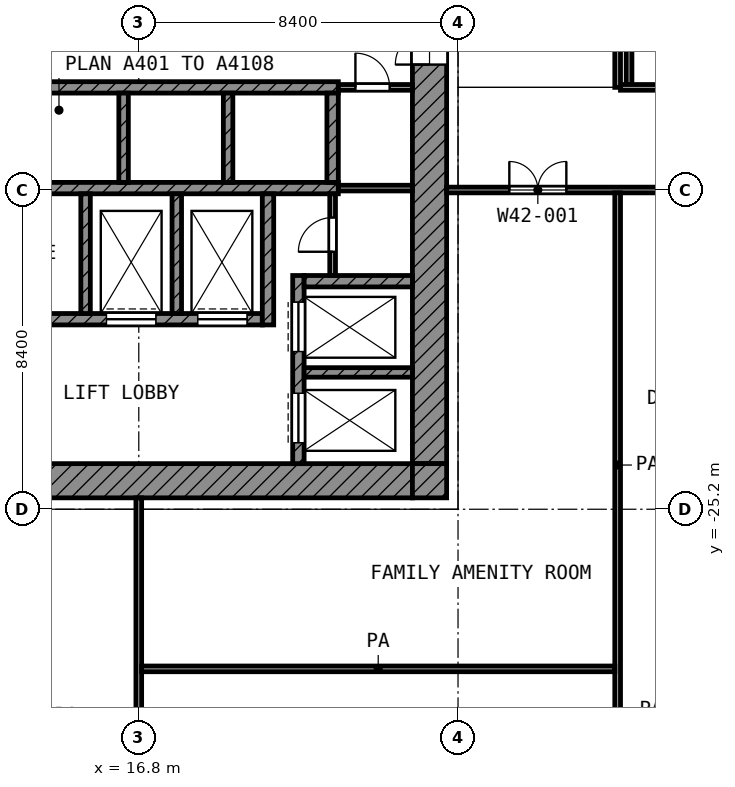
"""IFC4 building model, lengths in metres.
Left out: names, types, materials, properties, quantities, classifications, styles, units other than length and angle.
Written with IfcOpenShell. Run it as: python <this file> out.ifc"""

import sys

from ifc_helpers import new_model, si_unit, direction, frame, frame_2d, origin, place, context, subcontext, project, spatial, rectangle, extrude, element, fill, save


model = new_model("IFC4")
c1 = context("Model", 3, precision=1e-05, world=origin(), true_north=direction((0.0, 1.0)))
c2 = subcontext(c1, "Body", "Model", "MODEL_VIEW")
j1 = project(units=[si_unit("LENGTHUNIT", "METRE"), si_unit("PLANEANGLEUNIT", "RADIAN")], contexts=[c1])
p1 = place(None, origin())
s1 = spatial("IfcSite", under=j1, at=p1, CompositionType="ELEMENT")
p2 = place(p1, origin())
s2 = spatial("IfcBuilding", under=s1, at=p2, CompositionType="ELEMENT")
p3 = place(p2, frame((0.0, 0.0, 204.6)))
s3 = spatial("IfcBuildingStorey", under=s2, at=p3, CompositionType="ELEMENT", Elevation=204.6)
p4 = place(p3, frame((24.45, -24.0, 0.0), z_axis=(0.0, 0.0, 1.0), x_axis=(0.0, 1.0, 0.0)))
e1 = element("IfcWall", 1, at=p4, inside=s3, PredefinedType="SHEAR", context=c2, shape_type="SweptSolid", body=[
    extrude(rectangle(XDim=18.6, YDim=0.9, at=frame_2d((9.3, 0.0))), origin(), (0.0, 0.0, 1.0), 3.6),
])
p5 = place(p4, frame((10.5, 0.0, 0.0)))
e2 = element("IfcOpeningElement", 2, at=p5, cuts=e1, PredefinedType="OPENING", context=c2, shape_type="SweptSolid", body=[
    extrude(rectangle(XDim=1.8, YDim=2.1, at=frame_2d((0.9, 1.05))), frame((0.0, 0.46, 0.0), z_axis=(0.0, -1.0, 0.0), x_axis=(1.0, 0.0, 0.0)), (0.0, 0.0, 1.0), 0.92),
])
p6 = place(p3, frame((5.4, -24.45, 0.0), z_axis=(0.0, 0.0, 1.0), x_axis=(1.0, 0.0, 0.0)))
e3 = element("IfcWall", 3, at=p6, inside=s3, PredefinedType="SHEAR", context=c2, shape_type="SweptSolid", body=[
    extrude(rectangle(XDim=18.6, YDim=0.9, at=frame_2d((9.3, 0.0))), origin(), (0.0, 0.0, 1.0), 3.6),
])
p7 = place(p6, frame((6.3, 0.0, 0.0)))
e4 = element("IfcOpeningElement", 4, at=p7, cuts=e3, PredefinedType="OPENING", context=c2, shape_type="SweptSolid", body=[
    extrude(rectangle(XDim=1.8, YDim=2.1, at=frame_2d((0.9, 1.05))), frame((0.0, 0.46, 0.0), z_axis=(0.0, -1.0, 0.0), x_axis=(1.0, 0.0, 0.0)), (0.0, 0.0, 1.0), 0.92),
])
p8 = place(p3, frame((24.45, -24.9, 0.0), z_axis=(0.0, 0.0, 1.0), x_axis=(0.0, 1.0, 0.0)))
e5 = element("IfcWall", 5, at=p8, inside=s3, PredefinedType="SHEAR", context=c2, shape_type="SweptSolid", body=[
    extrude(rectangle(XDim=0.9, YDim=0.9, at=frame_2d((0.45, 0.0))), origin(), (0.0, 0.0, 1.0), 3.6),
])
p9 = place(p3, frame((5.4, -14.1, 0.0), z_axis=(0.0, 0.0, 1.0), x_axis=(1.0, 0.0, 0.0)))
e6 = element("IfcWall", 6, at=p9, inside=s3, PredefinedType="SHEAR", context=c2, shape_type="SweptSolid", body=[
    extrude(rectangle(XDim=16.65, YDim=0.3, at=frame_2d((8.325, 0.0))), origin(), (0.0, 0.0, 1.0), 3.6),
])
p10 = place(p9, frame((0.825, 0.0, 0.0)))
e7 = element("IfcOpeningElement", 7, at=p10, cuts=e6, PredefinedType="OPENING", context=c2, shape_type="SweptSolid", body=[
    extrude(rectangle(XDim=1.1, YDim=2.1, at=frame_2d((0.55, 1.05))), frame((0.0, 0.16, 0.0), z_axis=(0.0, -1.0, 0.0), x_axis=(1.0, 0.0, 0.0)), (0.0, 0.0, 1.0), 0.32),
])
p11 = place(p9, frame((3.575, 0.0, 0.0)))
e8 = element("IfcOpeningElement", 8, at=p11, cuts=e6, PredefinedType="OPENING", context=c2, shape_type="SweptSolid", body=[
    extrude(rectangle(XDim=1.1, YDim=2.1, at=frame_2d((0.55, 1.05))), frame((0.0, 0.16, 0.0), z_axis=(0.0, -1.0, 0.0), x_axis=(1.0, 0.0, 0.0)), (0.0, 0.0, 1.0), 0.32),
])
p12 = place(p3, frame((5.4, -16.75, 0.0), z_axis=(0.0, 0.0, 1.0), x_axis=(1.0, 0.0, 0.0)))
e9 = element("IfcWall", 9, at=p12, inside=s3, PredefinedType="SHEAR", context=c2, shape_type="SweptSolid", body=[
    extrude(rectangle(XDim=16.65, YDim=0.3, at=frame_2d((8.325, 0.0))), origin(), (0.0, 0.0, 1.0), 3.6),
])
p13 = place(p3, frame((5.4, -20.2, 0.0), z_axis=(0.0, 0.0, 1.0), x_axis=(1.0, 0.0, 0.0)))
e10 = element("IfcWall", 10, at=p13, inside=s3, PredefinedType="SHEAR", context=c2, shape_type="SweptSolid", body=[
    extrude(rectangle(XDim=14.65, YDim=0.3, at=frame_2d((7.325, 0.0))), origin(), (0.0, 0.0, 1.0), 3.6),
])
p14 = place(p13, frame((10.55, 0.0, 0.0)))
e11 = element("IfcOpeningElement", 11, at=p14, cuts=e10, PredefinedType="OPENING", context=c2, shape_type="SweptSolid", body=[
    extrude(rectangle(XDim=1.3, YDim=2.1, at=frame_2d((0.65, 1.05))), frame((0.0, 0.16, 0.0), z_axis=(0.0, -1.0, 0.0), x_axis=(1.0, 0.0, 0.0)), (0.0, 0.0, 1.0), 0.32),
])
p15 = place(p13, frame((12.95, 0.0, 0.0)))
e12 = element("IfcOpeningElement", 12, at=p15, cuts=e10, PredefinedType="OPENING", context=c2, shape_type="SweptSolid", body=[
    extrude(rectangle(XDim=1.3, YDim=2.1, at=frame_2d((0.65, 1.05))), frame((0.0, 0.16, 0.0), z_axis=(0.0, -1.0, 0.0), x_axis=(1.0, 0.0, 0.0)), (0.0, 0.0, 1.0), 0.32),
])
p16 = place(p13, frame((0.55, 0.0, 0.0)))
e13 = element("IfcOpeningElement", 13, at=p16, cuts=e10, PredefinedType="OPENING", context=c2, shape_type="SweptSolid", body=[
    extrude(rectangle(XDim=1.3, YDim=2.1, at=frame_2d((0.65, 1.05))), frame((0.0, 0.16, 0.0), z_axis=(0.0, -1.0, 0.0), x_axis=(1.0, 0.0, 0.0)), (0.0, 0.0, 1.0), 0.32),
])
p17 = place(p13, frame((2.95, 0.0, 0.0)))
e14 = element("IfcOpeningElement", 14, at=p17, cuts=e10, PredefinedType="OPENING", context=c2, shape_type="SweptSolid", body=[
    extrude(rectangle(XDim=1.3, YDim=2.1, at=frame_2d((0.65, 1.05))), frame((0.0, 0.16, 0.0), z_axis=(0.0, -1.0, 0.0), x_axis=(1.0, 0.0, 0.0)), (0.0, 0.0, 1.0), 0.32),
])
p18 = place(p13, frame((7.15, 0.0, 0.0)))
e15 = element("IfcOpeningElement", 15, at=p18, cuts=e10, PredefinedType="OPENING", context=c2, shape_type="SweptSolid", body=[
    extrude(rectangle(XDim=0.9, YDim=2.1, at=frame_2d((0.45, 1.05))), frame((0.0, 0.16, 0.0), z_axis=(0.0, -1.0, 0.0), x_axis=(1.0, 0.0, 0.0)), (0.0, 0.0, 1.0), 0.32),
])
p19 = place(p3, frame((20.2, -20.35, 0.0), z_axis=(0.0, 0.0, 1.0), x_axis=(0.0, 1.0, 0.0)))
e16 = element("IfcWall", 16, at=p19, inside=s3, PredefinedType="SHEAR", context=c2, shape_type="SweptSolid", body=[
    extrude(rectangle(XDim=3.45, YDim=0.3, at=frame_2d((1.725, 0.0))), origin(), (0.0, 0.0, 1.0), 3.6),
])
p20 = place(p3, frame((21.9, -16.6, 0.0), z_axis=(0.0, 0.0, 1.0), x_axis=(0.0, 1.0, 0.0)))
e17 = element("IfcWall", 17, at=p20, inside=s3, PredefinedType="SHEAR", context=c2, shape_type="SweptSolid", body=[
    extrude(rectangle(XDim=2.35, YDim=0.3, at=frame_2d((1.175, 0.0))), origin(), (0.0, 0.0, 1.0), 3.6),
])
p21 = place(p3, frame((21.15, -19.2, 0.0), z_axis=(0.0, 0.0, 1.0), x_axis=(1.0, 0.0, 0.0)))
e18 = element("IfcWall", 18, at=p21, inside=s3, PredefinedType="SHEAR", context=c2, shape_type="SweptSolid", body=[
    extrude(rectangle(XDim=2.85, YDim=0.3, at=frame_2d((1.425, 0.0))), origin(), (0.0, 0.0, 1.0), 3.6),
])
p22 = place(p3, frame((21.0, -24.0, 0.0), z_axis=(0.0, 0.0, 1.0), x_axis=(0.0, 1.0, 0.0)))
e19 = element("IfcWall", 19, at=p22, inside=s3, PredefinedType="SHEAR", context=c2, shape_type="SweptSolid", body=[
    extrude(rectangle(XDim=4.95, YDim=0.3, at=frame_2d((2.475, 0.0))), origin(), (0.0, 0.0, 1.0), 3.6),
])
p23 = place(p22, frame((2.95, 0.0, 0.0)))
e20 = element("IfcOpeningElement", 20, at=p23, cuts=e19, PredefinedType="OPENING", context=c2, shape_type="SweptSolid", body=[
    extrude(rectangle(XDim=1.3, YDim=2.1, at=frame_2d((0.65, 1.05))), frame((0.0, 0.16, 0.0), z_axis=(0.0, -1.0, 0.0), x_axis=(1.0, 0.0, 0.0)), (0.0, 0.0, 1.0), 0.32),
])
p24 = place(p22, frame((0.55, 0.0, 0.0)))
e21 = element("IfcOpeningElement", 21, at=p24, cuts=e19, PredefinedType="OPENING", context=c2, shape_type="SweptSolid", body=[
    extrude(rectangle(XDim=1.3, YDim=2.1, at=frame_2d((0.65, 1.05))), frame((0.0, 0.16, 0.0), z_axis=(0.0, -1.0, 0.0), x_axis=(1.0, 0.0, 0.0)), (0.0, 0.0, 1.0), 0.32),
])
p25 = place(p3, frame((21.15, -21.6, 0.0), z_axis=(0.0, 0.0, 1.0), x_axis=(1.0, 0.0, 0.0)))
e22 = element("IfcWall", 22, at=p25, inside=s3, PredefinedType="SHEAR", context=c2, shape_type="SweptSolid", body=[
    extrude(rectangle(XDim=2.85, YDim=0.25, at=frame_2d((1.425, 0.0))), origin(), (0.0, 0.0, 1.0), 3.6),
])
for number, where, z_axis, x_axis in (
    (23, (15.4, -20.05, 0.0), (0.0, 0.0, 1.0), (0.0, 1.0, 0.0)),
    (24, (17.8, -20.05, 0.0), (0.0, 0.0, 1.0), (0.0, 1.0, 0.0)),
):
    element("IfcWall", number, at=place(p3, frame(where, z_axis=z_axis, x_axis=x_axis)), inside=s3, PredefinedType="SHEAR", context=c2, shape_type="SweptSolid", body=[
        extrude(rectangle(XDim=3.15, YDim=0.25, at=frame_2d((1.575, 0.0))), origin(), (0.0, 0.0, 1.0), 3.6),
    ])
for number, where, z_axis, x_axis in (
    (25, (16.4, -16.6, 0.0), (0.0, 0.0, 1.0), (0.0, 1.0, 0.0)),
    (26, (19.15, -16.6, 0.0), (0.0, 0.0, 1.0), (0.0, 1.0, 0.0)),
):
    element("IfcWall", number, at=place(p3, frame(where, z_axis=z_axis, x_axis=x_axis)), inside=s3, PredefinedType="SHEAR", context=c2, shape_type="SweptSolid", body=[
        extrude(rectangle(XDim=2.35, YDim=0.25, at=frame_2d((1.175, 0.0))), origin(), (0.0, 0.0, 1.0), 3.6),
    ])
p26 = place(p3, frame((21.9, -19.05, 0.0), z_axis=(0.0, 0.0, 1.0), x_axis=(0.0, 1.0, 0.0)))
e27 = element("IfcWall", 27, at=p26, inside=s3, PredefinedType="PARTITIONING", context=c2, shape_type="SweptSolid", body=[
    extrude(rectangle(XDim=2.15, YDim=0.15, at=frame_2d((1.075, 0.0))), origin(), (0.0, 0.0, 1.0), 3.6),
])
p27 = place(p26, frame((0.625, 0.0, 0.0)))
e28 = element("IfcOpeningElement", 28, at=p27, cuts=e27, PredefinedType="OPENING", context=c2, shape_type="SweptSolid", body=[
    extrude(rectangle(XDim=0.9, YDim=2.1, at=frame_2d((0.45, 1.05))), frame((0.0, 0.085, 0.0), z_axis=(0.0, -1.0, 0.0), x_axis=(1.0, 0.0, 0.0)), (0.0, 0.0, 1.0), 0.17),
])
p28 = place(p3, frame((22.05, -16.75, 0.0), z_axis=(0.0, 0.0, 1.0), x_axis=(1.0, 0.0, 0.0)))
e29 = element("IfcWall", 29, at=p28, inside=s3, PredefinedType="PARTITIONING", context=c2, shape_type="SweptSolid", body=[
    extrude(rectangle(XDim=1.95, YDim=0.15, at=frame_2d((0.975, 0.0))), origin(), (0.0, 0.0, 1.0), 3.6),
])
p29 = place(p3, frame((22.05, -14.1, 0.0), z_axis=(0.0, 0.0, 1.0), x_axis=(1.0, 0.0, 0.0)))
e30 = element("IfcWall", 30, at=p29, inside=s3, PredefinedType="PARTITIONING", context=c2, shape_type="SweptSolid", body=[
    extrude(rectangle(XDim=1.95, YDim=0.15, at=frame_2d((0.975, 0.0))), origin(), (0.0, 0.0, 1.0), 3.6),
])
p30 = place(p29, frame((0.45, 0.0, 0.0)))
e31 = element("IfcOpeningElement", 31, at=p30, cuts=e30, PredefinedType="OPENING", context=c2, shape_type="SweptSolid", body=[
    extrude(rectangle(XDim=0.9, YDim=2.1, at=frame_2d((0.45, 1.05))), frame((0.0, 0.085, 0.0), z_axis=(0.0, -1.0, 0.0), x_axis=(1.0, 0.0, 0.0)), (0.0, 0.0, 1.0), 0.17),
])
p31 = place(p3, frame((16.875, -29.4, 0.0), z_axis=(0.0, 0.0, 1.0), x_axis=(1.0, 0.0, 0.0)))
e32 = element("IfcWall", 32, at=p31, inside=s3, PredefinedType="PARTITIONING", context=c2, shape_type="SweptSolid", body=[
    extrude(rectangle(XDim=12.45, YDim=0.15, at=frame_2d((6.225, 0.0))), origin(), (0.0, 0.0, 1.0), 3.6),
])
p32 = place(p3, frame((24.9, -16.8, 0.0), z_axis=(0.0, 0.0, 1.0), x_axis=(1.0, 0.0, 0.0)))
e33 = element("IfcWall", 33, at=p32, inside=s3, PredefinedType="PARTITIONING", context=c2, shape_type="SweptSolid", body=[
    extrude(rectangle(XDim=42.22, YDim=0.15, at=frame_2d((21.11, 0.0))), origin(), (0.0, 0.0, 1.0), 3.6),
])
p33 = place(p32, frame((1.65, 0.0, 0.0)))
e34 = element("IfcOpeningElement", 34, at=p33, cuts=e33, PredefinedType="OPENING", context=c2, shape_type="SweptSolid", body=[
    extrude(rectangle(XDim=1.5, YDim=2.1, at=frame_2d((0.75, 1.05))), frame((0.0, 0.085, 0.0), z_axis=(0.0, -1.0, 0.0), x_axis=(1.0, 0.0, 0.0)), (0.0, 0.0, 1.0), 0.17),
])
p34 = place(p32, frame((6.1, 0.0, 0.0)))
e35 = element("IfcOpeningElement", 35, at=p34, cuts=e33, PredefinedType="OPENING", context=c2, shape_type="SweptSolid", body=[
    extrude(rectangle(XDim=1.0, YDim=2.1, at=frame_2d((0.5, 1.05))), frame((0.0, 0.085, 0.0), z_axis=(0.0, -1.0, 0.0), x_axis=(1.0, 0.0, 0.0)), (0.0, 0.0, 1.0), 0.17),
])
p35 = place(p32, frame((10.2, 0.0, 0.0)))
e36 = element("IfcOpeningElement", 36, at=p35, cuts=e33, PredefinedType="OPENING", context=c2, shape_type="SweptSolid", body=[
    extrude(rectangle(XDim=1.2, YDim=2.1, at=frame_2d((0.6, 1.05))), frame((0.0, 0.085, 0.0), z_axis=(0.0, -1.0, 0.0), x_axis=(1.0, 0.0, 0.0)), (0.0, 0.0, 1.0), 0.17),
])
p36 = place(p32, frame((20.34, 0.0, 0.0)))
e37 = element("IfcOpeningElement", 37, at=p36, cuts=e33, PredefinedType="OPENING", context=c2, shape_type="SweptSolid", body=[
    extrude(rectangle(XDim=1.2, YDim=2.1, at=frame_2d((0.6, 1.05))), frame((0.0, 0.085, 0.0), z_axis=(0.0, -1.0, 0.0), x_axis=(1.0, 0.0, 0.0)), (0.0, 0.0, 1.0), 0.17),
])
p37 = place(p32, frame((18.78, 0.0, 0.0)))
e38 = element("IfcOpeningElement", 38, at=p37, cuts=e33, PredefinedType="OPENING", context=c2, shape_type="SweptSolid", body=[
    extrude(rectangle(XDim=1.2, YDim=2.1, at=frame_2d((0.6, 1.05))), frame((0.0, 0.085, 0.0), z_axis=(0.0, -1.0, 0.0), x_axis=(1.0, 0.0, 0.0)), (0.0, 0.0, 1.0), 0.17),
])
p38 = place(p32, frame((28.0, 0.0, 0.0)))
e39 = element("IfcOpeningElement", 39, at=p38, cuts=e33, PredefinedType="OPENING", context=c2, shape_type="SweptSolid", body=[
    extrude(rectangle(XDim=1.2, YDim=2.1, at=frame_2d((0.6, 1.05))), frame((0.0, 0.085, 0.0), z_axis=(0.0, -1.0, 0.0), x_axis=(1.0, 0.0, 0.0)), (0.0, 0.0, 1.0), 0.17),
])
p39 = place(p32, frame((26.48, 0.0, 0.0)))
e40 = element("IfcOpeningElement", 40, at=p39, cuts=e33, PredefinedType="OPENING", context=c2, shape_type="SweptSolid", body=[
    extrude(rectangle(XDim=1.2, YDim=2.1, at=frame_2d((0.6, 1.05))), frame((0.0, 0.085, 0.0), z_axis=(0.0, -1.0, 0.0), x_axis=(1.0, 0.0, 0.0)), (0.0, 0.0, 1.0), 0.17),
])
p40 = place(p32, frame((32.1, 0.0, 0.0)))
e41 = element("IfcOpeningElement", 41, at=p40, cuts=e33, PredefinedType="OPENING", context=c2, shape_type="SweptSolid", body=[
    extrude(rectangle(XDim=1.2, YDim=2.1, at=frame_2d((0.6, 1.05))), frame((0.0, 0.085, 0.0), z_axis=(0.0, -1.0, 0.0), x_axis=(1.0, 0.0, 0.0)), (0.0, 0.0, 1.0), 0.17),
])
p41 = place(p32, frame((37.35, 0.0, 0.0)))
e42 = element("IfcOpeningElement", 42, at=p41, cuts=e33, PredefinedType="OPENING", context=c2, shape_type="SweptSolid", body=[
    extrude(rectangle(XDim=1.5, YDim=2.1, at=frame_2d((0.75, 1.05))), frame((0.0, 0.085, 0.0), z_axis=(0.0, -1.0, 0.0), x_axis=(1.0, 0.0, 0.0)), (0.0, 0.0, 1.0), 0.17),
])
p42 = place(p3, frame((29.475, -14.1, 0.0), z_axis=(0.0, 0.0, 1.0), x_axis=(1.0, 0.0, 0.0)))
e43 = element("IfcWall", 43, at=p42, inside=s3, PredefinedType="PARTITIONING", context=c2, shape_type="SweptSolid", body=[
    extrude(rectangle(XDim=10.707, YDim=0.15, at=frame_2d((5.354, 0.0))), origin(), (0.0, 0.0, 1.0), 3.6),
])
p43 = place(p42, frame((1.675, 0.0, 0.0)))
e44 = element("IfcOpeningElement", 44, at=p43, cuts=e43, PredefinedType="OPENING", context=c2, shape_type="SweptSolid", body=[
    extrude(rectangle(XDim=1.0, YDim=2.1, at=frame_2d((0.5, 1.05))), frame((0.0, 0.085, 0.0), z_axis=(0.0, -1.0, 0.0), x_axis=(1.0, 0.0, 0.0)), (0.0, 0.0, 1.0), 0.17),
])
p44 = place(p42, frame((4.725, 0.0, 0.0)))
e45 = element("IfcOpeningElement", 45, at=p44, cuts=e43, PredefinedType="OPENING", context=c2, shape_type="SweptSolid", body=[
    extrude(rectangle(XDim=0.9, YDim=2.1, at=frame_2d((0.45, 1.05))), frame((0.0, 0.085, 0.0), z_axis=(0.0, -1.0, 0.0), x_axis=(1.0, 0.0, 0.0)), (0.0, 0.0, 1.0), 0.17),
])
p45 = place(p42, frame((6.775, 0.0, 0.0)))
e46 = element("IfcOpeningElement", 46, at=p45, cuts=e43, PredefinedType="OPENING", context=c2, shape_type="SweptSolid", body=[
    extrude(rectangle(XDim=1.0, YDim=2.1, at=frame_2d((0.5, 1.05))), frame((0.0, 0.085, 0.0), z_axis=(0.0, -1.0, 0.0), x_axis=(1.0, 0.0, 0.0)), (0.0, 0.0, 1.0), 0.17),
])
p46 = place(p3, frame((16.8, -54.52, 0.0), z_axis=(0.0, 0.0, 1.0), x_axis=(0.0, 1.0, 0.0)))
e47 = element("IfcWall", 47, at=p46, inside=s3, PredefinedType="PARTITIONING", context=c2, shape_type="SweptSolid", body=[
    extrude(rectangle(XDim=29.62, YDim=0.15, at=frame_2d((14.81, 0.0))), origin(), (0.0, 0.0, 1.0), 3.6),
])
p47 = place(p46, frame((21.52, 0.0, 0.0)))
e48 = element("IfcOpeningElement", 48, at=p47, cuts=e47, PredefinedType="OPENING", context=c2, shape_type="SweptSolid", body=[
    extrude(rectangle(XDim=1.2, YDim=2.1, at=frame_2d((0.6, 1.05))), frame((0.0, 0.085, 0.0), z_axis=(0.0, -1.0, 0.0), x_axis=(1.0, 0.0, 0.0)), (0.0, 0.0, 1.0), 0.17),
])
p48 = place(p46, frame((10.76, 0.0, 0.0)))
e49 = element("IfcOpeningElement", 49, at=p48, cuts=e47, PredefinedType="OPENING", context=c2, shape_type="SweptSolid", body=[
    extrude(rectangle(XDim=1.2, YDim=2.1, at=frame_2d((0.6, 1.05))), frame((0.0, 0.085, 0.0), z_axis=(0.0, -1.0, 0.0), x_axis=(1.0, 0.0, 0.0)), (0.0, 0.0, 1.0), 0.17),
])
p49 = place(p46, frame((9.2, 0.0, 0.0)))
e50 = element("IfcOpeningElement", 50, at=p49, cuts=e47, PredefinedType="OPENING", context=c2, shape_type="SweptSolid", body=[
    extrude(rectangle(XDim=1.2, YDim=2.1, at=frame_2d((0.6, 1.05))), frame((0.0, 0.085, 0.0), z_axis=(0.0, -1.0, 0.0), x_axis=(1.0, 0.0, 0.0)), (0.0, 0.0, 1.0), 0.17),
])
p50 = place(p46, frame((7.99, 0.0, 0.0)))
e51 = element("IfcOpeningElement", 51, at=p50, cuts=e47, PredefinedType="OPENING", context=c2, shape_type="SweptSolid", body=[
    extrude(rectangle(XDim=0.9, YDim=2.1, at=frame_2d((0.45, 1.05))), frame((0.0, 0.085, 0.0), z_axis=(0.0, -1.0, 0.0), x_axis=(1.0, 0.0, 0.0)), (0.0, 0.0, 1.0), 0.17),
])
p51 = place(p46, frame((2.07, 0.0, 0.0)))
e52 = element("IfcOpeningElement", 52, at=p51, cuts=e47, PredefinedType="OPENING", context=c2, shape_type="SweptSolid", body=[
    extrude(rectangle(XDim=1.5, YDim=2.1, at=frame_2d((0.75, 1.05))), frame((0.0, 0.085, 0.0), z_axis=(0.0, -1.0, 0.0), x_axis=(1.0, 0.0, 0.0)), (0.0, 0.0, 1.0), 0.17),
])
p52 = place(p3, frame((29.4, -31.198, 0.0), z_axis=(0.0, 0.0, 1.0), x_axis=(0.0, 1.0, 0.0)))
e53 = element("IfcWall", 53, at=p52, inside=s3, PredefinedType="PARTITIONING", context=c2, shape_type="SweptSolid", body=[
    extrude(rectangle(XDim=14.323, YDim=0.15, at=frame_2d((7.162, 0.0))), origin(), (0.0, 0.0, 1.0), 3.6),
])
p53 = place(p3, frame((29.4, -14.1, 0.0), z_axis=(0.0, 0.0, 1.0), x_axis=(0.0, 1.0, 0.0)))
e54 = element("IfcWall", 54, at=p53, inside=s3, PredefinedType="PARTITIONING", context=c2, shape_type="SweptSolid", body=[
    extrude(rectangle(XDim=2.998, YDim=0.15, at=frame_2d((1.499, 0.0))), origin(), (0.0, 0.0, 1.0), 3.6),
])
p54 = place(p3, frame((29.7, -14.025, 0.0), z_axis=(0.0, 0.0, 1.0), x_axis=(0.0, 1.0, 0.0)))
e55 = element("IfcWall", 55, at=p54, inside=s3, PredefinedType="PARTITIONING", context=c2, shape_type="SweptSolid", body=[
    extrude(rectangle(XDim=13.945, YDim=0.15, at=frame_2d((6.972, 0.0))), origin(), (0.0, 0.0, 1.0), 2.7),
])
p55 = place(p23, origin())
e56 = element("IfcDoor", 56, at=p55, inside=s3, OperationType="DOUBLE_DOOR_SLIDING", PredefinedType="DOOR", context=c2, shape_type="SweptSolid", body=[
    extrude(rectangle(XDim=1.3, YDim=2.1, at=frame_2d((0.65, 1.05))), frame((0.0, 0.025, 0.0), z_axis=(0.0, -1.0, 0.0), x_axis=(1.0, 0.0, 0.0)), (0.0, 0.0, 1.0), 0.05),
])
fill(e20, e56)
p56 = place(p24, origin())
e57 = element("IfcDoor", 57, at=p56, inside=s3, OperationType="DOUBLE_DOOR_SLIDING", PredefinedType="DOOR", context=c2, shape_type="SweptSolid", body=[
    extrude(rectangle(XDim=1.3, YDim=2.1, at=frame_2d((0.65, 1.05))), frame((0.0, 0.025, 0.0), z_axis=(0.0, -1.0, 0.0), x_axis=(1.0, 0.0, 0.0)), (0.0, 0.0, 1.0), 0.05),
])
fill(e21, e57)
p57 = place(p14, origin())
e58 = element("IfcDoor", 58, at=p57, inside=s3, OperationType="DOUBLE_DOOR_SLIDING", PredefinedType="DOOR", context=c2, shape_type="SweptSolid", body=[
    extrude(rectangle(XDim=1.3, YDim=2.1, at=frame_2d((0.65, 1.05))), frame((0.0, 0.025, 0.0), z_axis=(0.0, -1.0, 0.0), x_axis=(1.0, 0.0, 0.0)), (0.0, 0.0, 1.0), 0.05),
])
fill(e11, e58)
p58 = place(p15, origin())
e59 = element("IfcDoor", 59, at=p58, inside=s3, OperationType="DOUBLE_DOOR_SLIDING", PredefinedType="DOOR", context=c2, shape_type="SweptSolid", body=[
    extrude(rectangle(XDim=1.3, YDim=2.1, at=frame_2d((0.65, 1.05))), frame((0.0, 0.025, 0.0), z_axis=(0.0, -1.0, 0.0), x_axis=(1.0, 0.0, 0.0)), (0.0, 0.0, 1.0), 0.05),
])
fill(e12, e59)
p59 = place(p5, origin())
e60 = element("IfcDoor", 60, at=p59, inside=s3, OperationType="DOUBLE_DOOR_SINGLE_SWING", PredefinedType="DOOR", context=c2, shape_type="SweptSolid", body=[
    extrude(rectangle(XDim=1.8, YDim=2.1, at=frame_2d((0.9, 1.05))), frame((0.0, 0.025, 0.0), z_axis=(0.0, -1.0, 0.0), x_axis=(1.0, 0.0, 0.0)), (0.0, 0.0, 1.0), 0.05),
])
fill(e2, e60)
p60 = place(p30, origin())
e61 = element("IfcDoor", 61, at=p60, inside=s3, OperationType="SINGLE_SWING_LEFT", PredefinedType="DOOR", context=c2, shape_type="SweptSolid", body=[
    extrude(rectangle(XDim=0.9, YDim=2.1, at=frame_2d((0.45, 1.05))), frame((0.0, 0.025, 0.0), z_axis=(0.0, -1.0, 0.0), x_axis=(1.0, 0.0, 0.0)), (0.0, 0.0, 1.0), 0.05),
])
fill(e31, e61)
p61 = place(p27, origin())
e62 = element("IfcDoor", 62, at=p61, inside=s3, OperationType="SINGLE_SWING_LEFT", PredefinedType="DOOR", context=c2, shape_type="SweptSolid", body=[
    extrude(rectangle(XDim=0.9, YDim=2.1, at=frame_2d((0.45, 1.05))), frame((0.0, 0.025, 0.0), z_axis=(0.0, -1.0, 0.0), x_axis=(1.0, 0.0, 0.0)), (0.0, 0.0, 1.0), 0.05),
])
fill(e28, e62)
p62 = place(p33, origin())
e63 = element("IfcDoor", 63, at=p62, inside=s3, OperationType="DOUBLE_DOOR_SINGLE_SWING", PredefinedType="DOOR", context=c2, shape_type="SweptSolid", body=[
    extrude(rectangle(XDim=1.5, YDim=2.1, at=frame_2d((0.75, 1.05))), frame((0.0, 0.025, 0.0), z_axis=(0.0, -1.0, 0.0), x_axis=(1.0, 0.0, 0.0)), (0.0, 0.0, 1.0), 0.05),
])
fill(e34, e63)
save(model, sys.argv[1])
